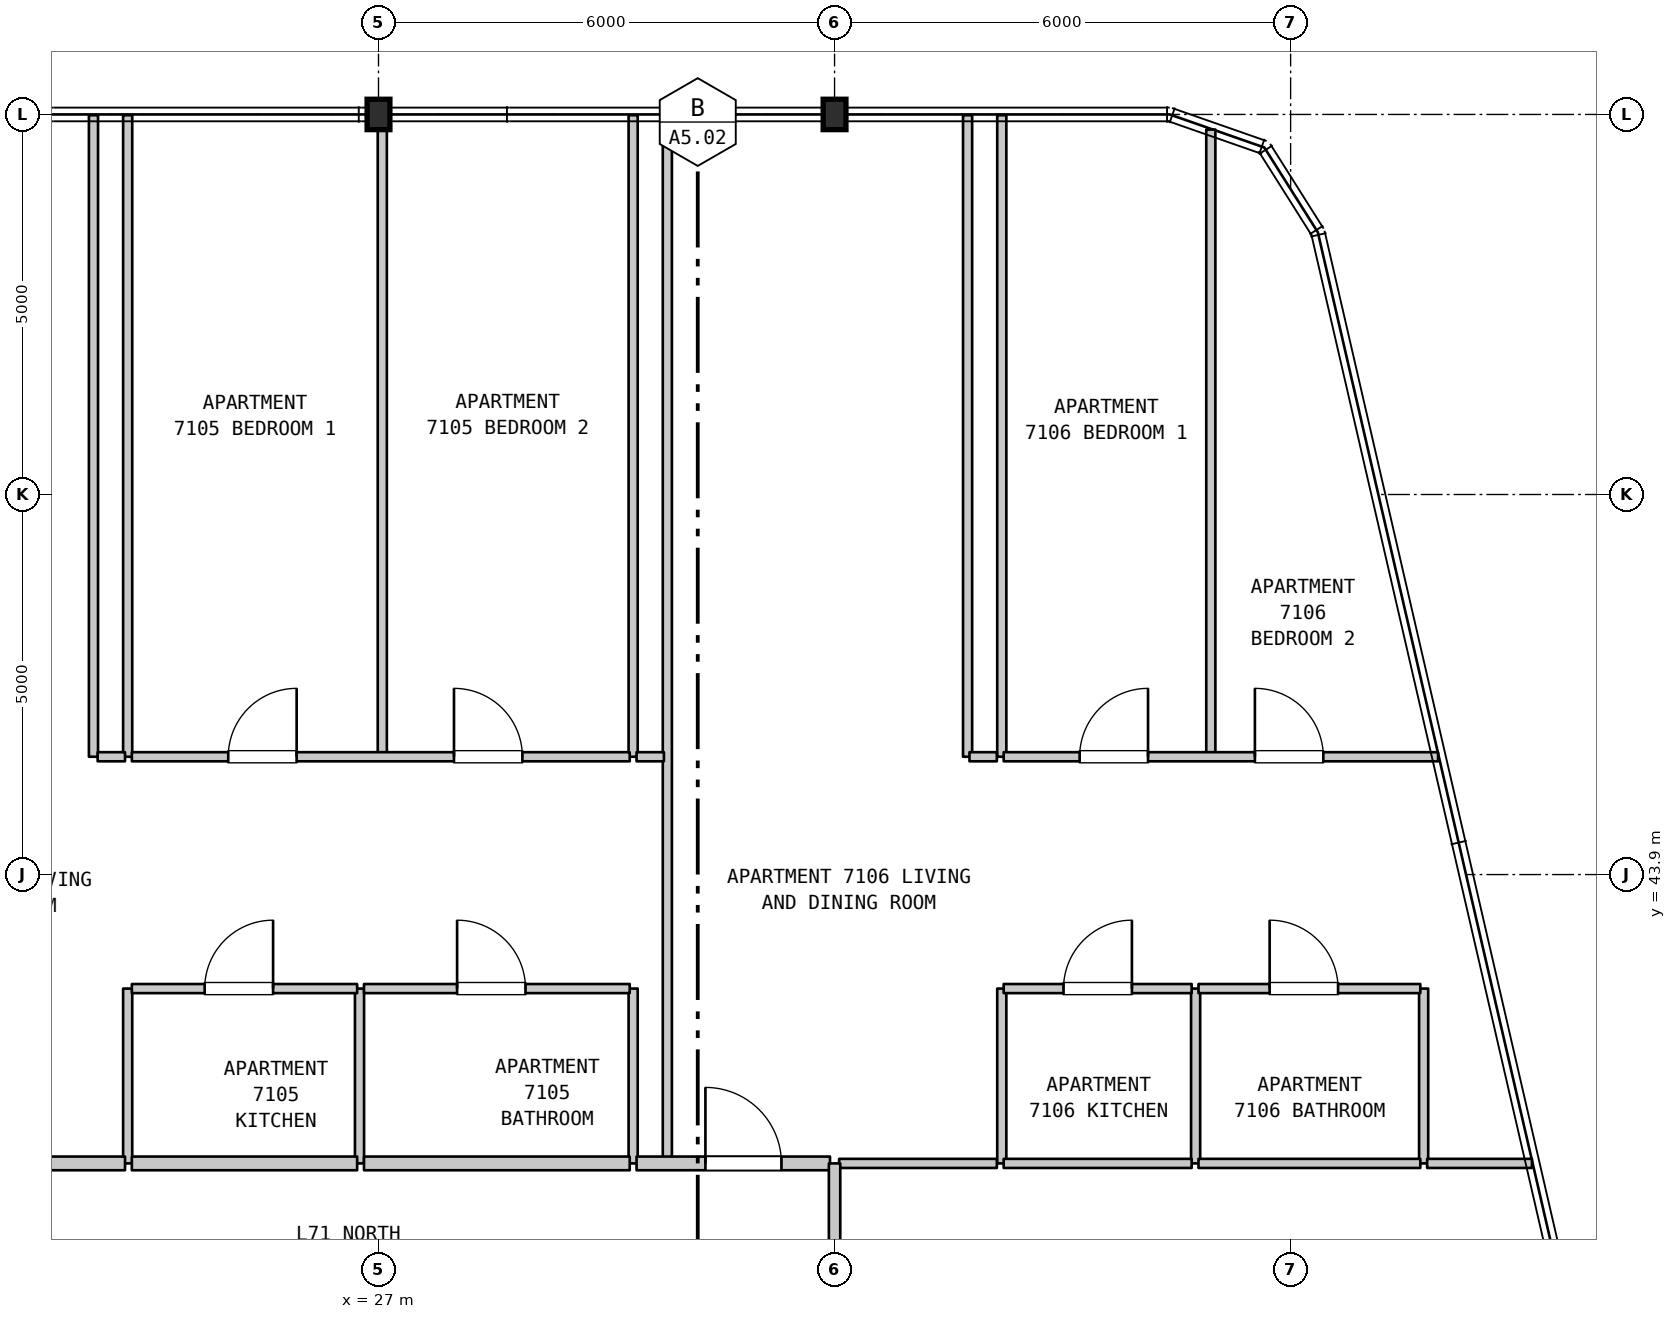
"""IFC4 building model, lengths in metres.
Left out: names, types, materials, properties, quantities, classifications, styles, units other than length and angle.
Written with IfcOpenShell. Run it as: python <this file> out.ifc"""

import sys

from ifc_helpers import new_model, si_unit, direction, frame, frame_2d, origin, origin_2d, place, context, subcontext, project, spatial, rectangle, i_section, extrude, element, fill, save


model = new_model("IFC4")
c1 = context("Model", 3, precision=1e-05, world=origin(), true_north=direction((0.0, 1.0)))
c2 = subcontext(c1, "Body", "Model", "MODEL_VIEW")
j1 = project(units=[si_unit("LENGTHUNIT", "METRE"), si_unit("PLANEANGLEUNIT", "RADIAN")], contexts=[c1])
p1 = place(None, origin())
s1 = spatial("IfcSite", under=j1, at=p1, CompositionType="ELEMENT")
p2 = place(p1, origin())
s2 = spatial("IfcBuilding", under=s1, at=p2, CompositionType="ELEMENT")
p3 = place(p2, frame((0.0, 0.0, 284.3)))
s3 = spatial("IfcBuildingStorey", under=s2, at=p3, CompositionType="ELEMENT", Elevation=284.3)
for number, where, z_axis, x_axis in (
    (1, (27.0, 53.9, 0.0), (0.0, 0.0, 1.0), (1.0, 0.0, 0.0)),
    (2, (33.0, 53.9, 0.0), (0.0, 0.0, 1.0), (1.0, 0.0, 0.0)),
):
    element("IfcColumn", number, at=place(p3, frame(where, z_axis=z_axis, x_axis=x_axis)), inside=s3, PredefinedType="COLUMN", context=c2, shape_type="SweptSolid", body=[
        extrude(i_section(OverallWidth=0.3, OverallDepth=0.4, WebThickness=0.013, FlangeThickness=0.024, FilletRadius=0.027, at=origin_2d()), origin(), (0.0, 0.0, 1.0), 3.7),
    ])
p4 = place(p3, frame((23.25, 45.45, 0.0), z_axis=(0.0, 0.0, 1.0), x_axis=(0.0, 1.0, 0.0)))
e3 = element("IfcWall", 3, at=p4, inside=s3, PredefinedType="PARTITIONING", context=c2, shape_type="SweptSolid", body=[
    extrude(rectangle(XDim=8.44, YDim=0.12, at=frame_2d((4.22, 0.0))), origin(), (0.0, 0.0, 1.0), 3.39),
])
p5 = place(p3, frame((23.7, 40.1, 0.0), z_axis=(0.0, 0.0, 1.0), x_axis=(0.0, 1.0, 0.0)))
e4 = element("IfcWall", 4, at=p5, inside=s3, PredefinedType="PARTITIONING", context=c2, shape_type="SweptSolid", body=[
    extrude(rectangle(XDim=2.3, YDim=0.12, at=frame_2d((1.15, 0.0))), origin(), (0.0, 0.0, 1.0), 3.39),
])
p6 = place(p3, frame((23.7, 45.45, 0.0), z_axis=(0.0, 0.0, 1.0), x_axis=(0.0, 1.0, 0.0)))
e5 = element("IfcWall", 5, at=p6, inside=s3, PredefinedType="PARTITIONING", context=c2, shape_type="SweptSolid", body=[
    extrude(rectangle(XDim=8.44, YDim=0.12, at=frame_2d((4.22, 0.0))), origin(), (0.0, 0.0, 1.0), 3.39),
])
p7 = place(p3, frame((26.75, 40.1, 0.0), z_axis=(0.0, 0.0, 1.0), x_axis=(0.0, 1.0, 0.0)))
e6 = element("IfcWall", 6, at=p7, inside=s3, PredefinedType="PARTITIONING", context=c2, shape_type="SweptSolid", body=[
    extrude(rectangle(XDim=2.3, YDim=0.12, at=frame_2d((1.15, 0.0))), origin(), (0.0, 0.0, 1.0), 3.39),
])
p8 = place(p3, frame((27.05, 45.45, 0.0), z_axis=(0.0, 0.0, 1.0), x_axis=(0.0, 1.0, 0.0)))
e7 = element("IfcWall", 7, at=p8, inside=s3, PredefinedType="PARTITIONING", context=c2, shape_type="SweptSolid", body=[
    extrude(rectangle(XDim=8.44, YDim=0.12, at=frame_2d((4.22, 0.0))), origin(), (0.0, 0.0, 1.0), 3.15),
])
p9 = place(p3, frame((30.35, 40.1, 0.0), z_axis=(0.0, 0.0, 1.0), x_axis=(0.0, 1.0, 0.0)))
e8 = element("IfcWall", 8, at=p9, inside=s3, PredefinedType="PARTITIONING", context=c2, shape_type="SweptSolid", body=[
    extrude(rectangle(XDim=2.3, YDim=0.12, at=frame_2d((1.15, 0.0))), origin(), (0.0, 0.0, 1.0), 3.39),
])
p10 = place(p3, frame((30.35, 45.45, 0.0), z_axis=(0.0, 0.0, 1.0), x_axis=(0.0, 1.0, 0.0)))
e9 = element("IfcWall", 9, at=p10, inside=s3, PredefinedType="PARTITIONING", context=c2, shape_type="SweptSolid", body=[
    extrude(rectangle(XDim=8.44, YDim=0.12, at=frame_2d((4.22, 0.0))), origin(), (0.0, 0.0, 1.0), 3.39),
])
p11 = place(p3, frame((30.8, 40.1, 0.0), z_axis=(0.0, 0.0, 1.0), x_axis=(0.0, 1.0, 0.0)))
e10 = element("IfcWall", 10, at=p11, inside=s3, PredefinedType="PARTITIONING", context=c2, shape_type="SweptSolid", body=[
    extrude(rectangle(XDim=13.79, YDim=0.12, at=frame_2d((6.895, 0.0))), origin(), (0.0, 0.0, 1.0), 3.39),
])
p12 = place(p3, frame((34.75, 45.45, 0.0), z_axis=(0.0, 0.0, 1.0), x_axis=(0.0, 1.0, 0.0)))
e11 = element("IfcWall", 11, at=p12, inside=s3, PredefinedType="PARTITIONING", context=c2, shape_type="SweptSolid", body=[
    extrude(rectangle(XDim=8.44, YDim=0.12, at=frame_2d((4.22, 0.0))), origin(), (0.0, 0.0, 1.0), 3.39),
])
p13 = place(p3, frame((35.2, 40.1, 0.0), z_axis=(0.0, 0.0, 1.0), x_axis=(0.0, 1.0, 0.0)))
e12 = element("IfcWall", 12, at=p13, inside=s3, PredefinedType="PARTITIONING", context=c2, shape_type="SweptSolid", body=[
    extrude(rectangle(XDim=2.3, YDim=0.12, at=frame_2d((1.15, 0.0))), origin(), (0.0, 0.0, 1.0), 3.39),
])
p14 = place(p3, frame((35.2, 45.45, 0.0), z_axis=(0.0, 0.0, 1.0), x_axis=(0.0, 1.0, 0.0)))
e13 = element("IfcWall", 13, at=p14, inside=s3, PredefinedType="PARTITIONING", context=c2, shape_type="SweptSolid", body=[
    extrude(rectangle(XDim=8.44, YDim=0.12, at=frame_2d((4.22, 0.0))), origin(), (0.0, 0.0, 1.0), 3.39),
])
p15 = place(p3, frame((37.75, 40.1, 0.0), z_axis=(0.0, 0.0, 1.0), x_axis=(0.0, 1.0, 0.0)))
e14 = element("IfcWall", 14, at=p15, inside=s3, PredefinedType="PARTITIONING", context=c2, shape_type="SweptSolid", body=[
    extrude(rectangle(XDim=2.3, YDim=0.12, at=frame_2d((1.15, 0.0))), origin(), (0.0, 0.0, 1.0), 3.39),
])
p16 = place(p3, frame((37.95, 45.45, 0.0), z_axis=(0.0, 0.0, 1.0), x_axis=(0.0, 1.0, 0.0)))
e15 = element("IfcWall", 15, at=p16, inside=s3, PredefinedType="PARTITIONING", context=c2, shape_type="SweptSolid", body=[
    extrude(rectangle(XDim=8.251, YDim=0.12, at=frame_2d((4.125, 0.0))), origin(), (0.0, 0.0, 1.0), 3.39),
])
p17 = place(p3, frame((40.75, 40.1, 0.0), z_axis=(0.0, 0.0, 1.0), x_axis=(0.0, 1.0, 0.0)))
e16 = element("IfcWall", 16, at=p17, inside=s3, PredefinedType="PARTITIONING", context=c2, shape_type="SweptSolid", body=[
    extrude(rectangle(XDim=2.3, YDim=0.12, at=frame_2d((1.15, 0.0))), origin(), (0.0, 0.0, 1.0), 3.39),
])
p18 = place(p3, frame((19.245, 40.1, 0.0), z_axis=(0.0, 0.0, 1.0), x_axis=(1.0, 0.0, 0.0)))
e17 = element("IfcWall", 17, at=p18, inside=s3, PredefinedType="STANDARD", context=c2, shape_type="SweptSolid", body=[
    extrude(rectangle(XDim=4.42, YDim=0.18, at=frame_2d((2.21, 0.0))), origin(), (0.0, 0.0, 1.0), 3.39),
])
p19 = place(p18, frame((1.638, 0.0, 0.0)))
e18 = element("IfcOpeningElement", 18, at=p19, cuts=e17, PredefinedType="OPENING", context=c2, shape_type="SweptSolid", body=[
    extrude(rectangle(XDim=1.0, YDim=2.15, at=frame_2d((0.5, 1.075))), frame((0.0, 0.1, 0.0), z_axis=(0.0, -1.0, 0.0), x_axis=(1.0, 0.0, 0.0)), (0.0, 0.0, 1.0), 0.2),
])
p20 = place(p3, frame((23.755, 40.1, 0.0), z_axis=(0.0, 0.0, 1.0), x_axis=(1.0, 0.0, 0.0)))
e19 = element("IfcWall", 19, at=p20, inside=s3, PredefinedType="STANDARD", context=c2, shape_type="SweptSolid", body=[
    extrude(rectangle(XDim=2.964, YDim=0.18, at=frame_2d((1.482, 0.0))), origin(), (0.0, 0.0, 1.0), 3.39),
])
p21 = place(p3, frame((26.809, 40.1, 0.0), z_axis=(0.0, 0.0, 1.0), x_axis=(1.0, 0.0, 0.0)))
e20 = element("IfcWall", 20, at=p21, inside=s3, PredefinedType="STANDARD", context=c2, shape_type="SweptSolid", body=[
    extrude(rectangle(XDim=3.496, YDim=0.18, at=frame_2d((1.748, 0.0))), origin(), (0.0, 0.0, 1.0), 3.39),
])
p22 = place(p3, frame((30.395, 40.1, 0.0), z_axis=(0.0, 0.0, 1.0), x_axis=(1.0, 0.0, 0.0)))
e21 = element("IfcWall", 21, at=p22, inside=s3, PredefinedType="STANDARD", context=c2, shape_type="SweptSolid", body=[
    extrude(rectangle(XDim=2.545, YDim=0.18, at=frame_2d((1.272, 0.0))), origin(), (0.0, 0.0, 1.0), 3.39),
])
p23 = place(p22, frame((0.906, 0.0, 0.0)))
e22 = element("IfcOpeningElement", 22, at=p23, cuts=e21, PredefinedType="OPENING", context=c2, shape_type="SweptSolid", body=[
    extrude(rectangle(XDim=1.0, YDim=2.15, at=frame_2d((0.5, 1.075))), frame((0.0, 0.1, 0.0), z_axis=(0.0, -1.0, 0.0), x_axis=(1.0, 0.0, 0.0)), (0.0, 0.0, 1.0), 0.2),
])
p24 = place(p3, frame((33.06, 40.1, 0.0), z_axis=(0.0, 0.0, 1.0), x_axis=(1.0, 0.0, 0.0)))
e23 = element("IfcWall", 23, at=p24, inside=s3, PredefinedType="PARTITIONING", context=c2, shape_type="SweptSolid", body=[
    extrude(rectangle(XDim=2.075, YDim=0.12, at=frame_2d((1.038, 0.0))), origin(), (0.0, 0.0, 1.0), 3.39),
])
p25 = place(p3, frame((35.225, 40.1, 0.0), z_axis=(0.0, 0.0, 1.0), x_axis=(1.0, 0.0, 0.0)))
e24 = element("IfcWall", 24, at=p25, inside=s3, PredefinedType="PARTITIONING", context=c2, shape_type="SweptSolid", body=[
    extrude(rectangle(XDim=2.473, YDim=0.12, at=frame_2d((1.236, 0.0))), origin(), (0.0, 0.0, 1.0), 3.39),
])
p26 = place(p3, frame((37.788, 40.1, 0.0), z_axis=(0.0, 0.0, 1.0), x_axis=(1.0, 0.0, 0.0)))
e25 = element("IfcWall", 25, at=p26, inside=s3, PredefinedType="PARTITIONING", context=c2, shape_type="SweptSolid", body=[
    extrude(rectangle(XDim=2.918, YDim=0.12, at=frame_2d((1.459, 0.0))), origin(), (0.0, 0.0, 1.0), 3.39),
])
p27 = place(p3, frame((40.796, 40.1, 0.0), z_axis=(0.0, 0.0, 1.0), x_axis=(1.0, 0.0, 0.0)))
e26 = element("IfcWall", 26, at=p27, inside=s3, PredefinedType="PARTITIONING", context=c2, shape_type="SweptSolid", body=[
    extrude(rectangle(XDim=1.379, YDim=0.12, at=frame_2d((0.689, 0.0))), origin(), (0.0, 0.0, 1.0), 3.39),
])
p28 = place(p3, frame((23.755, 42.4, 0.0), z_axis=(0.0, 0.0, 1.0), x_axis=(1.0, 0.0, 0.0)))
e27 = element("IfcWall", 27, at=p28, inside=s3, PredefinedType="PARTITIONING", context=c2, shape_type="SweptSolid", body=[
    extrude(rectangle(XDim=2.964, YDim=0.12, at=frame_2d((1.482, 0.0))), origin(), (0.0, 0.0, 1.0), 3.39),
])
p29 = place(p28, frame((0.958, 0.0, 0.0)))
e28 = element("IfcOpeningElement", 28, at=p29, cuts=e27, PredefinedType="OPENING", context=c2, shape_type="SweptSolid", body=[
    extrude(rectangle(XDim=0.9, YDim=2.15, at=frame_2d((0.45, 1.075))), frame((0.0, 0.07, 0.0), z_axis=(0.0, -1.0, 0.0), x_axis=(1.0, 0.0, 0.0)), (0.0, 0.0, 1.0), 0.14),
])
p30 = place(p3, frame((26.809, 42.4, 0.0), z_axis=(0.0, 0.0, 1.0), x_axis=(1.0, 0.0, 0.0)))
e29 = element("IfcWall", 29, at=p30, inside=s3, PredefinedType="PARTITIONING", context=c2, shape_type="SweptSolid", body=[
    extrude(rectangle(XDim=3.496, YDim=0.12, at=frame_2d((1.748, 0.0))), origin(), (0.0, 0.0, 1.0), 3.39),
])
p31 = place(p30, frame((1.225, 0.0, 0.0)))
e30 = element("IfcOpeningElement", 30, at=p31, cuts=e29, PredefinedType="OPENING", context=c2, shape_type="SweptSolid", body=[
    extrude(rectangle(XDim=0.9, YDim=2.1, at=frame_2d((0.45, 1.05))), frame((0.0, 0.07, 0.0), z_axis=(0.0, -1.0, 0.0), x_axis=(1.0, 0.0, 0.0)), (0.0, 0.0, 1.0), 0.14),
])
p32 = place(p3, frame((35.225, 42.4, 0.0), z_axis=(0.0, 0.0, 1.0), x_axis=(1.0, 0.0, 0.0)))
e31 = element("IfcWall", 31, at=p32, inside=s3, PredefinedType="PARTITIONING", context=c2, shape_type="SweptSolid", body=[
    extrude(rectangle(XDim=2.473, YDim=0.12, at=frame_2d((1.236, 0.0))), origin(), (0.0, 0.0, 1.0), 3.39),
])
p33 = place(p32, frame((0.787, 0.0, 0.0)))
e32 = element("IfcOpeningElement", 32, at=p33, cuts=e31, PredefinedType="OPENING", context=c2, shape_type="SweptSolid", body=[
    extrude(rectangle(XDim=0.9, YDim=2.15, at=frame_2d((0.45, 1.075))), frame((0.0, 0.07, 0.0), z_axis=(0.0, -1.0, 0.0), x_axis=(1.0, 0.0, 0.0)), (0.0, 0.0, 1.0), 0.14),
])
p34 = place(p3, frame((37.788, 42.4, 0.0), z_axis=(0.0, 0.0, 1.0), x_axis=(1.0, 0.0, 0.0)))
e33 = element("IfcWall", 33, at=p34, inside=s3, PredefinedType="PARTITIONING", context=c2, shape_type="SweptSolid", body=[
    extrude(rectangle(XDim=2.918, YDim=0.12, at=frame_2d((1.459, 0.0))), origin(), (0.0, 0.0, 1.0), 3.39),
])
p35 = place(p34, frame((0.936, 0.0, 0.0)))
e34 = element("IfcOpeningElement", 34, at=p35, cuts=e33, PredefinedType="OPENING", context=c2, shape_type="SweptSolid", body=[
    extrude(rectangle(XDim=0.9, YDim=2.1, at=frame_2d((0.45, 1.05))), frame((0.0, 0.07, 0.0), z_axis=(0.0, -1.0, 0.0), x_axis=(1.0, 0.0, 0.0)), (0.0, 0.0, 1.0), 0.14),
])
p36 = place(p3, frame((23.305, 45.45, 0.0), z_axis=(0.0, 0.0, 1.0), x_axis=(1.0, 0.0, 0.0)))
e35 = element("IfcWall", 35, at=p36, inside=s3, PredefinedType="PARTITIONING", context=c2, shape_type="SweptSolid", body=[
    extrude(rectangle(XDim=0.36, YDim=0.12, at=frame_2d((0.18, 0.0))), origin(), (0.0, 0.0, 1.0), 3.39),
])
p37 = place(p3, frame((23.755, 45.45, 0.0), z_axis=(0.0, 0.0, 1.0), x_axis=(1.0, 0.0, 0.0)))
e36 = element("IfcWall", 36, at=p37, inside=s3, PredefinedType="PARTITIONING", context=c2, shape_type="SweptSolid", body=[
    extrude(rectangle(XDim=6.55, YDim=0.12, at=frame_2d((3.275, 0.0))), origin(), (0.0, 0.0, 1.0), 3.39),
])
p38 = place(p37, frame((1.268, 0.0, 0.0)))
e37 = element("IfcOpeningElement", 37, at=p38, cuts=e36, PredefinedType="OPENING", context=c2, shape_type="SweptSolid", body=[
    extrude(rectangle(XDim=0.9, YDim=2.15, at=frame_2d((0.45, 1.075))), frame((0.0, 0.07, 0.0), z_axis=(0.0, -1.0, 0.0), x_axis=(1.0, 0.0, 0.0)), (0.0, 0.0, 1.0), 0.14),
])
p39 = place(p37, frame((4.238, 0.0, 0.0)))
e38 = element("IfcOpeningElement", 38, at=p39, cuts=e36, PredefinedType="OPENING", context=c2, shape_type="SweptSolid", body=[
    extrude(rectangle(XDim=0.9, YDim=2.15, at=frame_2d((0.45, 1.075))), frame((0.0, 0.07, 0.0), z_axis=(0.0, -1.0, 0.0), x_axis=(1.0, 0.0, 0.0)), (0.0, 0.0, 1.0), 0.14),
])
p40 = place(p3, frame((30.395, 45.45, 0.0), z_axis=(0.0, 0.0, 1.0), x_axis=(1.0, 0.0, 0.0)))
e39 = element("IfcWall", 39, at=p40, inside=s3, PredefinedType="PARTITIONING", context=c2, shape_type="SweptSolid", body=[
    extrude(rectangle(XDim=0.36, YDim=0.12, at=frame_2d((0.18, 0.0))), origin(), (0.0, 0.0, 1.0), 3.39),
])
p41 = place(p3, frame((34.775, 45.45, 0.0), z_axis=(0.0, 0.0, 1.0), x_axis=(1.0, 0.0, 0.0)))
e40 = element("IfcWall", 40, at=p41, inside=s3, PredefinedType="PARTITIONING", context=c2, shape_type="SweptSolid", body=[
    extrude(rectangle(XDim=0.36, YDim=0.12, at=frame_2d((0.18, 0.0))), origin(), (0.0, 0.0, 1.0), 3.39),
])
p42 = place(p3, frame((35.225, 45.45, 0.0), z_axis=(0.0, 0.0, 1.0), x_axis=(1.0, 0.0, 0.0)))
e41 = element("IfcWall", 41, at=p42, inside=s3, PredefinedType="PARTITIONING", context=c2, shape_type="SweptSolid", body=[
    extrude(rectangle(XDim=5.715, YDim=0.12, at=frame_2d((2.857, 0.0))), origin(), (0.0, 0.0, 1.0), 3.39),
])
p43 = place(p42, frame((0.999, 0.0, 0.0)))
e42 = element("IfcOpeningElement", 42, at=p43, cuts=e41, PredefinedType="OPENING", context=c2, shape_type="SweptSolid", body=[
    extrude(rectangle(XDim=0.9, YDim=2.15, at=frame_2d((0.45, 1.075))), frame((0.0, 0.07, 0.0), z_axis=(0.0, -1.0, 0.0), x_axis=(1.0, 0.0, 0.0)), (0.0, 0.0, 1.0), 0.14),
])
p44 = place(p42, frame((3.305, 0.0, 0.0)))
e43 = element("IfcOpeningElement", 43, at=p44, cuts=e41, PredefinedType="OPENING", context=c2, shape_type="SweptSolid", body=[
    extrude(rectangle(XDim=0.9, YDim=2.15, at=frame_2d((0.45, 1.075))), frame((0.0, 0.07, 0.0), z_axis=(0.0, -1.0, 0.0), x_axis=(1.0, 0.0, 0.0)), (0.0, 0.0, 1.0), 0.14),
])
p45 = place(p3, frame((33.0, 37.9, 0.0), z_axis=(0.0, 0.0, 1.0), x_axis=(0.0, 1.0, 0.0)))
e44 = element("IfcWall", 44, at=p45, inside=s3, PredefinedType="STANDARD", context=c2, shape_type="SweptSolid", body=[
    extrude(rectangle(XDim=2.2, YDim=0.15, at=frame_2d((1.1, 0.0))), origin(), (0.0, 0.0, 1.0), 2.79),
])
p46 = place(p23, origin())
e45 = element("IfcDoor", 45, at=p46, inside=s3, OperationType="SINGLE_SWING_LEFT", PredefinedType="DOOR", context=c2, shape_type="SweptSolid", body=[
    extrude(rectangle(XDim=1.0, YDim=2.15, at=frame_2d((0.5, 1.075))), frame((0.0, 0.025, 0.0), z_axis=(0.0, -1.0, 0.0), x_axis=(1.0, 0.0, 0.0)), (0.0, 0.0, 1.0), 0.05),
])
fill(e22, e45)
p47 = place(p29, origin())
e46 = element("IfcDoor", 46, at=p47, inside=s3, OperationType="SINGLE_SWING_RIGHT", PredefinedType="DOOR", context=c2, shape_type="SweptSolid", body=[
    extrude(rectangle(XDim=0.9, YDim=2.15, at=frame_2d((0.45, 1.075))), frame((0.0, 0.025, 0.0), z_axis=(0.0, -1.0, 0.0), x_axis=(1.0, 0.0, 0.0)), (0.0, 0.0, 1.0), 0.05),
])
fill(e28, e46)
p48 = place(p31, origin())
e47 = element("IfcDoor", 47, at=p48, inside=s3, OperationType="SINGLE_SWING_LEFT", PredefinedType="DOOR", context=c2, shape_type="SweptSolid", body=[
    extrude(rectangle(XDim=0.9, YDim=2.1, at=frame_2d((0.45, 1.05))), frame((0.0, 0.025, 0.0), z_axis=(0.0, -1.0, 0.0), x_axis=(1.0, 0.0, 0.0)), (0.0, 0.0, 1.0), 0.05),
])
fill(e30, e47)
p49 = place(p33, origin())
e48 = element("IfcDoor", 48, at=p49, inside=s3, OperationType="SINGLE_SWING_RIGHT", PredefinedType="DOOR", context=c2, shape_type="SweptSolid", body=[
    extrude(rectangle(XDim=0.9, YDim=2.15, at=frame_2d((0.45, 1.075))), frame((0.0, 0.025, 0.0), z_axis=(0.0, -1.0, 0.0), x_axis=(1.0, 0.0, 0.0)), (0.0, 0.0, 1.0), 0.05),
])
fill(e32, e48)
p50 = place(p35, origin())
e49 = element("IfcDoor", 49, at=p50, inside=s3, OperationType="SINGLE_SWING_LEFT", PredefinedType="DOOR", context=c2, shape_type="SweptSolid", body=[
    extrude(rectangle(XDim=0.9, YDim=2.1, at=frame_2d((0.45, 1.05))), frame((0.0, 0.025, 0.0), z_axis=(0.0, -1.0, 0.0), x_axis=(1.0, 0.0, 0.0)), (0.0, 0.0, 1.0), 0.05),
])
fill(e34, e49)
p51 = place(p38, origin())
e50 = element("IfcDoor", 50, at=p51, inside=s3, OperationType="SINGLE_SWING_RIGHT", PredefinedType="DOOR", context=c2, shape_type="SweptSolid", body=[
    extrude(rectangle(XDim=0.9, YDim=2.15, at=frame_2d((0.45, 1.075))), frame((0.0, 0.025, 0.0), z_axis=(0.0, -1.0, 0.0), x_axis=(1.0, 0.0, 0.0)), (0.0, 0.0, 1.0), 0.05),
])
fill(e37, e50)
p52 = place(p39, origin())
e51 = element("IfcDoor", 51, at=p52, inside=s3, OperationType="SINGLE_SWING_LEFT", PredefinedType="DOOR", context=c2, shape_type="SweptSolid", body=[
    extrude(rectangle(XDim=0.9, YDim=2.15, at=frame_2d((0.45, 1.075))), frame((0.0, 0.025, 0.0), z_axis=(0.0, -1.0, 0.0), x_axis=(1.0, 0.0, 0.0)), (0.0, 0.0, 1.0), 0.05),
])
fill(e38, e51)
p53 = place(p43, origin())
e52 = element("IfcDoor", 52, at=p53, inside=s3, OperationType="SINGLE_SWING_RIGHT", PredefinedType="DOOR", context=c2, shape_type="SweptSolid", body=[
    extrude(rectangle(XDim=0.9, YDim=2.15, at=frame_2d((0.45, 1.075))), frame((0.0, 0.025, 0.0), z_axis=(0.0, -1.0, 0.0), x_axis=(1.0, 0.0, 0.0)), (0.0, 0.0, 1.0), 0.05),
])
fill(e42, e52)
p54 = place(p44, origin())
e53 = element("IfcDoor", 53, at=p54, inside=s3, OperationType="SINGLE_SWING_LEFT", PredefinedType="DOOR", context=c2, shape_type="SweptSolid", body=[
    extrude(rectangle(XDim=0.9, YDim=2.15, at=frame_2d((0.45, 1.075))), frame((0.0, 0.025, 0.0), z_axis=(0.0, -1.0, 0.0), x_axis=(1.0, 0.0, 0.0)), (0.0, 0.0, 1.0), 0.05),
])
fill(e43, e53)
save(model, sys.argv[1])
